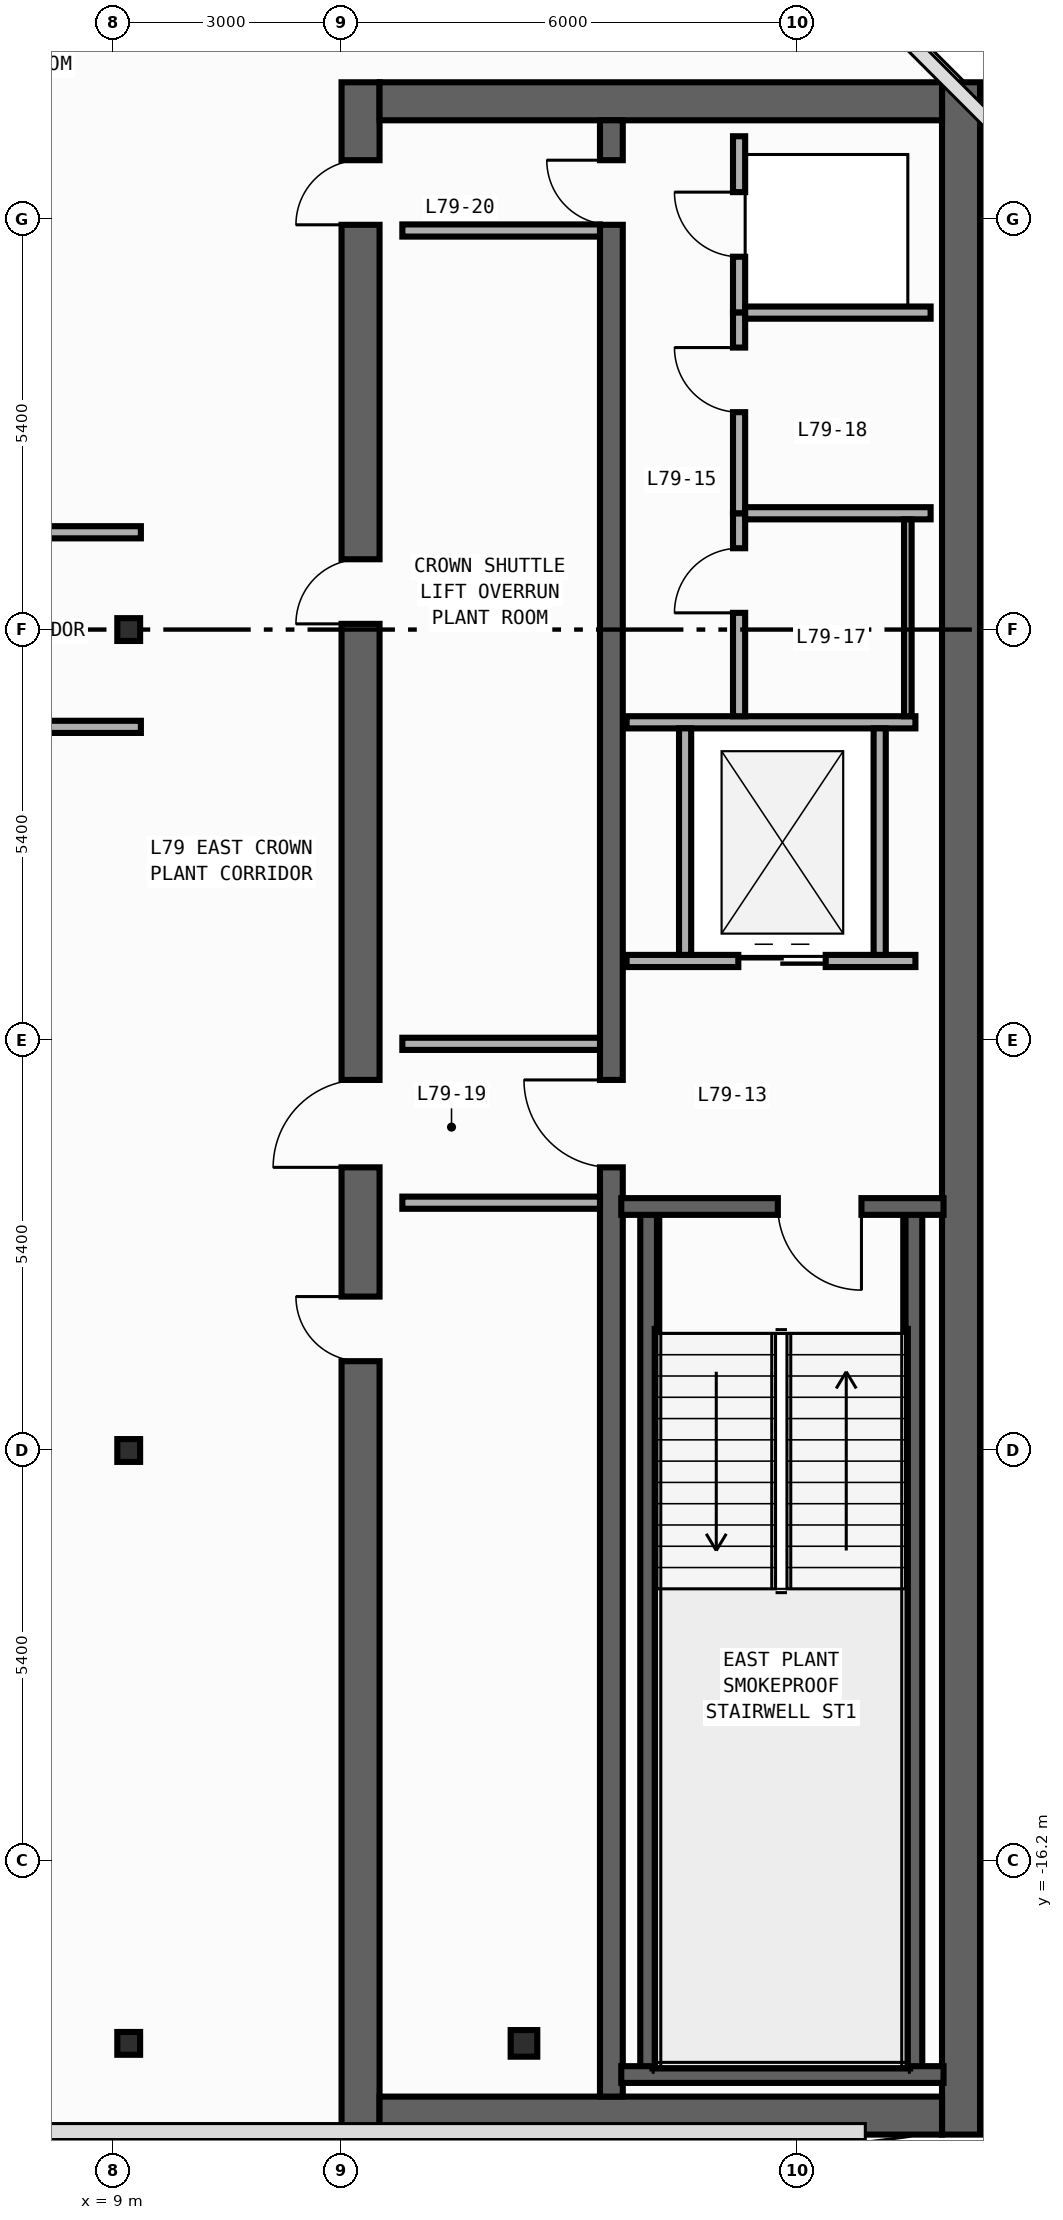
"""IFC4 building model, lengths in metres.
Left out: names, types, materials, properties, quantities, classifications, styles, units other than length and angle.
Written with IfcOpenShell. Run it as: python <this file> out.ifc"""

import sys

from ifc_helpers import new_model, si_unit, direction, frame, frame_2d, origin, origin_2d, place, context, subcontext, project, spatial, rectangle, i_section, extrude, element, fill, save


model = new_model("IFC4")
c1 = context("Model", 3, precision=1e-05, world=origin(), true_north=direction((0.0, 1.0)))
c2 = subcontext(c1, "Body", "Model", "MODEL_VIEW")
j1 = project(units=[si_unit("LENGTHUNIT", "METRE"), si_unit("PLANEANGLEUNIT", "RADIAN")], contexts=[c1])
p1 = place(None, origin())
s1 = spatial("IfcSite", under=j1, at=p1, CompositionType="ELEMENT")
p2 = place(p1, origin())
s2 = spatial("IfcBuilding", under=s1, at=p2, CompositionType="ELEMENT")
p3 = place(p2, frame((0.0, 0.0, 330.4)))
s3 = spatial("IfcBuildingStorey", under=s2, at=p3, CompositionType="ELEMENT", Elevation=330.4)
p4 = place(p3, frame((12.25, -19.8, 0.0), z_axis=(0.0, 0.0, 1.0), x_axis=(0.0, 1.0, 0.0)))
e1 = element("IfcWall", 1, at=p4, inside=s3, PredefinedType="SHEAR", context=c2, shape_type="SweptSolid", body=[
    extrude(rectangle(XDim=27.0, YDim=0.5, at=frame_2d((13.5, 0.0))), origin(), (0.0, 0.0, 1.0), 4.34),
])
p5 = place(p4, frame((19.875, 0.0, 0.0)))
e2 = element("IfcOpeningElement", 2, at=p5, cuts=e1, PredefinedType="OPENING", context=c2, shape_type="SweptSolid", body=[
    extrude(rectangle(XDim=0.85, YDim=2.1, at=frame_2d((0.425, 1.05))), frame((0.0, 0.26, 0.0), z_axis=(0.0, -1.0, 0.0), x_axis=(1.0, 0.0, 0.0)), (0.0, 0.0, 1.0), 0.52),
])
p6 = place(p4, frame((10.175, 0.0, 0.0)))
e3 = element("IfcOpeningElement", 3, at=p6, cuts=e1, PredefinedType="OPENING", context=c2, shape_type="SweptSolid", body=[
    extrude(rectangle(XDim=0.85, YDim=2.1, at=frame_2d((0.425, 1.05))), frame((0.0, 0.26, 0.0), z_axis=(0.0, -1.0, 0.0), x_axis=(1.0, 0.0, 0.0)), (0.0, 0.0, 1.0), 0.52),
])
p7 = place(p4, frame((12.725, 0.0, 0.0)))
e4 = element("IfcOpeningElement", 4, at=p7, cuts=e1, PredefinedType="OPENING", context=c2, shape_type="SweptSolid", body=[
    extrude(rectangle(XDim=1.15, YDim=2.2, at=frame_2d((0.575, 1.1))), frame((0.0, 0.26, 0.0), z_axis=(0.0, -1.0, 0.0), x_axis=(1.0, 0.0, 0.0)), (0.0, 0.0, 1.0), 0.52),
])
p8 = place(p4, frame((25.125, 0.0, 0.0)))
e5 = element("IfcOpeningElement", 5, at=p8, cuts=e1, PredefinedType="OPENING", context=c2, shape_type="SweptSolid", body=[
    extrude(rectangle(XDim=0.85, YDim=2.1, at=frame_2d((0.425, 1.05))), frame((0.0, 0.26, 0.0), z_axis=(0.0, -1.0, 0.0), x_axis=(1.0, 0.0, 0.0)), (0.0, 0.0, 1.0), 0.52),
])
p9 = place(p3, frame((20.15, -19.8, 0.0), z_axis=(0.0, 0.0, 1.0), x_axis=(0.0, 1.0, 0.0)))
e6 = element("IfcWall", 6, at=p9, inside=s3, PredefinedType="SHEAR", context=c2, shape_type="SweptSolid", body=[
    extrude(rectangle(XDim=27.0, YDim=0.5, at=frame_2d((13.5, 0.0))), origin(), (0.0, 0.0, 1.0), 4.34),
])
for number, where, z_axis, x_axis in (
    (7, (12.5, -19.55, 0.0), (0.0, 0.0, 1.0), (1.0, 0.0, 0.0)),
    (8, (12.5, 6.95, 0.0), (0.0, 0.0, 1.0), (1.0, 0.0, 0.0)),
):
    element("IfcWall", number, at=place(p3, frame(where, z_axis=z_axis, x_axis=x_axis)), inside=s3, PredefinedType="SHEAR", context=c2, shape_type="SweptSolid", body=[
        extrude(rectangle(XDim=7.4, YDim=0.5, at=frame_2d((3.7, 0.0))), origin(), (0.0, 0.0, 1.0), 4.34),
    ])
p10 = place(p3, frame((15.55, -19.3, 0.0), z_axis=(0.0, 0.0, 1.0), x_axis=(0.0, 1.0, 0.0)))
e9 = element("IfcWall", 9, at=p10, inside=s3, PredefinedType="SHEAR", context=c2, shape_type="SweptSolid", body=[
    extrude(rectangle(XDim=26.0, YDim=0.3, at=frame_2d((13.0, 0.0))), origin(), (0.0, 0.0, 1.0), 4.34),
])
p11 = place(p10, frame((12.225, 0.0, 0.0)))
e10 = element("IfcOpeningElement", 10, at=p11, cuts=e9, PredefinedType="OPENING", context=c2, shape_type="SweptSolid", body=[
    extrude(rectangle(XDim=1.15, YDim=2.2, at=frame_2d((0.575, 1.1))), frame((0.0, 0.16, 0.0), z_axis=(0.0, -1.0, 0.0), x_axis=(1.0, 0.0, 0.0)), (0.0, 0.0, 1.0), 0.32),
])
p12 = place(p10, frame((24.625, 0.0, 0.0)))
e11 = element("IfcOpeningElement", 11, at=p12, cuts=e9, PredefinedType="OPENING", context=c2, shape_type="SweptSolid", body=[
    extrude(rectangle(XDim=0.85, YDim=2.1, at=frame_2d((0.425, 1.05))), frame((0.0, 0.16, 0.0), z_axis=(0.0, -1.0, 0.0), x_axis=(1.0, 0.0, 0.0)), (0.0, 0.0, 1.0), 0.32),
])
for number, where, z_axis, x_axis in (
    (12, (16.04, -19.01, 0.0), (0.0, 0.0, 1.0), (0.0, 1.0, 0.0)),
    (13, (19.53, -19.01, 0.0), (0.0, 0.0, 1.0), (0.0, 1.0, 0.0)),
):
    element("IfcWall", number, at=place(p3, frame(where, z_axis=z_axis, x_axis=x_axis)), inside=s3, PredefinedType="SHEAR", context=c2, shape_type="SweptSolid", body=[
        extrude(rectangle(XDim=11.42, YDim=0.22, at=frame_2d((5.71, 0.0))), origin(), (0.0, 0.0, 1.0), 4.34),
    ])
p13 = place(p3, frame((15.68, -19.01, 0.0), z_axis=(0.0, 0.0, 1.0), x_axis=(1.0, 0.0, 0.0)))
e14 = element("IfcWall", 14, at=p13, inside=s3, PredefinedType="SHEAR", context=c2, shape_type="SweptSolid", body=[
    extrude(rectangle(XDim=4.24, YDim=0.22, at=frame_2d((2.12, 0.0))), origin(), (0.0, 0.0, 1.0), 4.34),
])
p14 = place(p3, frame((19.92, -7.59, 0.0), z_axis=(0.0, 0.0, 1.0), x_axis=(-1.0, 0.0, 0.0)))
e15 = element("IfcWall", 15, at=p14, inside=s3, PredefinedType="SHEAR", context=c2, shape_type="SweptSolid", body=[
    extrude(rectangle(XDim=4.24, YDim=0.22, at=frame_2d((2.12, 0.0))), origin(), (0.0, 0.0, 1.0), 4.34),
])
p15 = place(p14, frame((1.08, 0.0, 0.0)))
e16 = element("IfcOpeningElement", 16, at=p15, cuts=e15, PredefinedType="OPENING", context=c2, shape_type="SweptSolid", body=[
    extrude(rectangle(XDim=1.1, YDim=2.2, at=frame_2d((0.55, 1.1))), frame((0.0, 0.12, 0.0), z_axis=(0.0, -1.0, 0.0), x_axis=(1.0, 0.0, 0.0)), (0.0, 0.0, 1.0), 0.24),
])
for number, where, z_axis, x_axis in (
    (17, (9.2, -18.6, 0.0), (0.0, 0.0, 1.0), (1.0, 0.0, 0.0)),
    (18, (9.2, -10.8, 0.0), (0.0, 0.0, 1.0), (1.0, 0.0, 0.0)),
    (19, (9.2, 0.0, 0.0), (0.0, 0.0, 1.0), (1.0, 0.0, 0.0)),
):
    element("IfcColumn", number, at=place(p3, frame(where, z_axis=z_axis, x_axis=x_axis)), inside=s3, PredefinedType="COLUMN", context=c2, shape_type="SweptSolid", body=[
        extrude(i_section(OverallWidth=0.3, OverallDepth=0.3, WebThickness=0.01, FlangeThickness=0.015, FilletRadius=0.018, at=origin_2d()), origin(), (0.0, 0.0, 1.0), 4.6),
    ])
p16 = place(p3, frame((14.4, -18.6, 0.0), z_axis=(0.0, 0.0, 1.0), x_axis=(1.0, 0.0, 0.0)))
e20 = element("IfcColumn", 20, at=p16, inside=s3, PredefinedType="COLUMN", context=c2, shape_type="SweptSolid", body=[
    extrude(i_section(OverallWidth=0.35, OverallDepth=0.35, WebThickness=0.012, FlangeThickness=0.019, FilletRadius=0.02, at=origin_2d()), origin(), (0.0, 0.0, 1.0), 4.6),
])
p17 = place(p3, frame((15.75, -4.36, 0.0), z_axis=(0.0, 0.0, 1.0), x_axis=(1.0, 0.0, 0.0)))
e21 = element("IfcWall", 21, at=p17, inside=s3, PredefinedType="STANDARD", context=c2, shape_type="SweptSolid", body=[
    extrude(rectangle(XDim=3.8, YDim=0.16, at=frame_2d((1.9, 0.0))), origin(), (0.0, 0.0, 1.0), 4.34),
])
p18 = place(p17, frame((1.47, 0.0, 0.0)))
e22 = element("IfcOpeningElement", 22, at=p18, cuts=e21, PredefinedType="OPENING", context=c2, shape_type="SweptSolid", body=[
    extrude(rectangle(XDim=1.15, YDim=2.2, at=frame_2d((0.575, 1.1))), frame((0.0, 0.09, 0.0), z_axis=(0.0, -1.0, 0.0), x_axis=(1.0, 0.0, 0.0)), (0.0, 0.0, 1.0), 0.18),
])
p19 = place(p3, frame((15.75, -1.22, 0.0), z_axis=(0.0, 0.0, 1.0), x_axis=(1.0, 0.0, 0.0)))
e23 = element("IfcWall", 23, at=p19, inside=s3, PredefinedType="STANDARD", context=c2, shape_type="SweptSolid", body=[
    extrude(rectangle(XDim=3.8, YDim=0.16, at=frame_2d((1.9, 0.0))), origin(), (0.0, 0.0, 1.0), 4.34),
])
for number, where, z_axis, x_axis in (
    (24, (16.52, -4.28, 0.0), (0.0, 0.0, 1.0), (0.0, 1.0, 0.0)),
    (25, (19.08, -4.28, 0.0), (0.0, 0.0, 1.0), (0.0, 1.0, 0.0)),
):
    element("IfcWall", number, at=place(p3, frame(where, z_axis=z_axis, x_axis=x_axis)), inside=s3, PredefinedType="STANDARD", context=c2, shape_type="SweptSolid", body=[
        extrude(rectangle(XDim=2.98, YDim=0.16, at=frame_2d((1.49, 0.0))), origin(), (0.0, 0.0, 1.0), 4.34),
    ])
for number, where, z_axis, x_axis in (
    (26, (12.8, -5.45, 0.0), (0.0, 0.0, 1.0), (1.0, 0.0, 0.0)),
    (27, (12.8, -7.54, 0.0), (0.0, 0.0, 1.0), (1.0, 0.0, 0.0)),
    (28, (12.8, 5.25, 0.0), (0.0, 0.0, 1.0), (1.0, 0.0, 0.0)),
):
    element("IfcWall", number, at=place(p3, frame(where, z_axis=z_axis, x_axis=x_axis)), inside=s3, PredefinedType="STANDARD", context=c2, shape_type="SweptSolid", body=[
        extrude(rectangle(XDim=2.6, YDim=0.16, at=frame_2d((1.3, 0.0))), origin(), (0.0, 0.0, 1.0), 4.34),
    ])
p20 = place(p3, frame((17.23, 4.17, 0.0), z_axis=(0.0, 0.0, 1.0), x_axis=(0.0, 1.0, 0.0)))
e29 = element("IfcWall", 29, at=p20, inside=s3, PredefinedType="PARTITIONING", context=c2, shape_type="SweptSolid", body=[
    extrude(rectangle(XDim=2.32, YDim=0.16, at=frame_2d((1.16, 0.0))), origin(), (0.0, 0.0, 1.0), 4.34),
])
p21 = place(p20, frame((0.735, 0.0, 0.0)))
e30 = element("IfcOpeningElement", 30, at=p21, cuts=e29, PredefinedType="OPENING", context=c2, shape_type="SweptSolid", body=[
    extrude(rectangle(XDim=0.85, YDim=2.1, at=frame_2d((0.425, 1.05))), frame((0.0, 0.09, 0.0), z_axis=(0.0, -1.0, 0.0), x_axis=(1.0, 0.0, 0.0)), (0.0, 0.0, 1.0), 0.18),
])
p22 = place(p3, frame((17.23, -1.14, 0.0), z_axis=(0.0, 0.0, 1.0), x_axis=(0.0, 1.0, 0.0)))
e31 = element("IfcWall", 31, at=p22, inside=s3, PredefinedType="PARTITIONING", context=c2, shape_type="SweptSolid", body=[
    extrude(rectangle(XDim=2.67, YDim=0.16, at=frame_2d((1.335, 0.0))), origin(), (0.0, 0.0, 1.0), 4.34),
])
p23 = place(p22, frame((1.36, 0.0, 0.0)))
e32 = element("IfcOpeningElement", 32, at=p23, cuts=e31, PredefinedType="OPENING", context=c2, shape_type="SweptSolid", body=[
    extrude(rectangle(XDim=0.85, YDim=2.1, at=frame_2d((0.425, 1.05))), frame((0.0, 0.09, 0.0), z_axis=(0.0, -1.0, 0.0), x_axis=(1.0, 0.0, 0.0)), (0.0, 0.0, 1.0), 0.18),
])
p24 = place(p3, frame((17.23, 1.53, 0.0), z_axis=(0.0, 0.0, 1.0), x_axis=(0.0, 1.0, 0.0)))
e33 = element("IfcWall", 33, at=p24, inside=s3, PredefinedType="PARTITIONING", context=c2, shape_type="SweptSolid", body=[
    extrude(rectangle(XDim=2.64, YDim=0.16, at=frame_2d((1.32, 0.0))), origin(), (0.0, 0.0, 1.0), 4.34),
])
p25 = place(p24, frame((1.33, 0.0, 0.0)))
e34 = element("IfcOpeningElement", 34, at=p25, cuts=e33, PredefinedType="OPENING", context=c2, shape_type="SweptSolid", body=[
    extrude(rectangle(XDim=0.85, YDim=2.1, at=frame_2d((0.425, 1.05))), frame((0.0, 0.09, 0.0), z_axis=(0.0, -1.0, 0.0), x_axis=(1.0, 0.0, 0.0)), (0.0, 0.0, 1.0), 0.18),
])
for number, where, z_axis, x_axis in (
    (35, (17.31, 4.17, 0.0), (0.0, 0.0, 1.0), (1.0, 0.0, 0.0)),
    (36, (17.31, 1.53, 0.0), (0.0, 0.0, 1.0), (1.0, 0.0, 0.0)),
):
    element("IfcWall", number, at=place(p3, frame(where, z_axis=z_axis, x_axis=x_axis)), inside=s3, PredefinedType="PARTITIONING", context=c2, shape_type="SweptSolid", body=[
        extrude(rectangle(XDim=2.44, YDim=0.16, at=frame_2d((1.22, 0.0))), origin(), (0.0, 0.0, 1.0), 4.34),
    ])
p26 = place(p3, frame((-1.12, -1.28, 0.0), z_axis=(0.0, 0.0, 1.0), x_axis=(1.0, 0.0, 0.0)))
e37 = element("IfcWall", 37, at=p26, inside=s3, PredefinedType="PARTITIONING", context=c2, shape_type="SweptSolid", body=[
    extrude(rectangle(XDim=10.48, YDim=0.16, at=frame_2d((5.24, 0.0))), origin(), (0.0, 0.0, 1.0), 4.34),
])
p27 = place(p26, frame((0.661, 0.0, 0.0)))
e38 = element("IfcOpeningElement", 38, at=p27, cuts=e37, PredefinedType="OPENING", context=c2, shape_type="SweptSolid", body=[
    extrude(rectangle(XDim=0.9, YDim=2.15, at=frame_2d((0.45, 1.075))), frame((0.0, 0.09, 0.0), z_axis=(0.0, -1.0, 0.0), x_axis=(1.0, 0.0, 0.0)), (0.0, 0.0, 1.0), 0.18),
])
p28 = place(p3, frame((4.58, 1.28, 0.0), z_axis=(0.0, 0.0, 1.0), x_axis=(1.0, 0.0, 0.0)))
e39 = element("IfcWall", 39, at=p28, inside=s3, PredefinedType="PARTITIONING", context=c2, shape_type="SweptSolid", body=[
    extrude(rectangle(XDim=4.78, YDim=0.16, at=frame_2d((2.39, 0.0))), origin(), (0.0, 0.0, 1.0), 4.34),
])
p29 = place(p28, frame((0.46, 0.0, 0.0)))
e40 = element("IfcOpeningElement", 40, at=p29, cuts=e39, PredefinedType="OPENING", context=c2, shape_type="SweptSolid", body=[
    extrude(rectangle(XDim=0.9, YDim=2.15, at=frame_2d((0.45, 1.075))), frame((0.0, 0.09, 0.0), z_axis=(0.0, -1.0, 0.0), x_axis=(1.0, 0.0, 0.0)), (0.0, 0.0, 1.0), 0.18),
])
p30 = place(p3, frame((19.45, 1.45, 0.0), z_axis=(0.0, 0.0, 1.0), x_axis=(0.0, -1.0, 0.0)))
e41 = element("IfcWall", 41, at=p30, inside=s3, PredefinedType="PARTITIONING", context=c2, shape_type="SweptSolid", body=[
    extrude(rectangle(XDim=2.59, YDim=0.1, at=frame_2d((1.295, 0.0))), origin(), (0.0, 0.0, 1.0), 4.34),
])
p31 = place(p15, origin())
e42 = element("IfcDoor", 42, at=p31, inside=s3, OperationType="SINGLE_SWING_LEFT", PredefinedType="DOOR", context=c2, shape_type="SweptSolid", body=[
    extrude(rectangle(XDim=1.1, YDim=2.2, at=frame_2d((0.55, 1.1))), frame((0.0, 0.025, 0.0), z_axis=(0.0, -1.0, 0.0), x_axis=(1.0, 0.0, 0.0)), (0.0, 0.0, 1.0), 0.05),
])
fill(e16, e42)
p32 = place(p5, origin())
e43 = element("IfcDoor", 43, at=p32, inside=s3, OperationType="SINGLE_SWING_LEFT", PredefinedType="DOOR", context=c2, shape_type="SweptSolid", body=[
    extrude(rectangle(XDim=0.85, YDim=2.1, at=frame_2d((0.425, 1.05))), frame((0.0, 0.025, 0.0), z_axis=(0.0, -1.0, 0.0), x_axis=(1.0, 0.0, 0.0)), (0.0, 0.0, 1.0), 0.05),
])
fill(e2, e43)
p33 = place(p6, origin())
e44 = element("IfcDoor", 44, at=p33, inside=s3, OperationType="SINGLE_SWING_RIGHT", PredefinedType="DOOR", context=c2, shape_type="SweptSolid", body=[
    extrude(rectangle(XDim=0.85, YDim=2.1, at=frame_2d((0.425, 1.05))), frame((0.0, 0.025, 0.0), z_axis=(0.0, -1.0, 0.0), x_axis=(1.0, 0.0, 0.0)), (0.0, 0.0, 1.0), 0.05),
])
fill(e3, e44)
p34 = place(p7, origin())
e45 = element("IfcDoor", 45, at=p34, inside=s3, OperationType="SINGLE_SWING_LEFT", PredefinedType="DOOR", context=c2, shape_type="SweptSolid", body=[
    extrude(rectangle(XDim=1.15, YDim=2.2, at=frame_2d((0.575, 1.1))), frame((0.0, 0.025, 0.0), z_axis=(0.0, -1.0, 0.0), x_axis=(1.0, 0.0, 0.0)), (0.0, 0.0, 1.0), 0.05),
])
fill(e4, e45)
p35 = place(p11, origin())
e46 = element("IfcDoor", 46, at=p35, inside=s3, OperationType="SINGLE_SWING_RIGHT", PredefinedType="DOOR", context=c2, shape_type="SweptSolid", body=[
    extrude(rectangle(XDim=1.15, YDim=2.2, at=frame_2d((0.575, 1.1))), frame((0.0, 0.025, 0.0), z_axis=(0.0, -1.0, 0.0), x_axis=(1.0, 0.0, 0.0)), (0.0, 0.0, 1.0), 0.05),
])
fill(e10, e46)
p36 = place(p8, origin())
e47 = element("IfcDoor", 47, at=p36, inside=s3, OperationType="SINGLE_SWING_LEFT", PredefinedType="DOOR", context=c2, shape_type="SweptSolid", body=[
    extrude(rectangle(XDim=0.85, YDim=2.1, at=frame_2d((0.425, 1.05))), frame((0.0, 0.025, 0.0), z_axis=(0.0, -1.0, 0.0), x_axis=(1.0, 0.0, 0.0)), (0.0, 0.0, 1.0), 0.05),
])
fill(e5, e47)
p37 = place(p12, origin())
e48 = element("IfcDoor", 48, at=p37, inside=s3, OperationType="SINGLE_SWING_RIGHT", PredefinedType="DOOR", context=c2, shape_type="SweptSolid", body=[
    extrude(rectangle(XDim=0.85, YDim=2.1, at=frame_2d((0.425, 1.05))), frame((0.0, 0.025, 0.0), z_axis=(0.0, -1.0, 0.0), x_axis=(1.0, 0.0, 0.0)), (0.0, 0.0, 1.0), 0.05),
])
fill(e11, e48)
p38 = place(p18, origin())
e49 = element("IfcDoor", 49, at=p38, inside=s3, OperationType="DOUBLE_DOOR_SLIDING", PredefinedType="DOOR", context=c2, shape_type="SweptSolid", body=[
    extrude(rectangle(XDim=1.15, YDim=2.2, at=frame_2d((0.575, 1.1))), frame((0.0, 0.025, 0.0), z_axis=(0.0, -1.0, 0.0), x_axis=(1.0, 0.0, 0.0)), (0.0, 0.0, 1.0), 0.05),
])
fill(e22, e49)
p39 = place(p21, origin())
e50 = element("IfcDoor", 50, at=p39, inside=s3, OperationType="SINGLE_SWING_RIGHT", PredefinedType="DOOR", context=c2, shape_type="SweptSolid", body=[
    extrude(rectangle(XDim=0.85, YDim=2.1, at=frame_2d((0.425, 1.05))), frame((0.0, 0.025, 0.0), z_axis=(0.0, -1.0, 0.0), x_axis=(1.0, 0.0, 0.0)), (0.0, 0.0, 1.0), 0.05),
])
fill(e30, e50)
p40 = place(p23, origin())
e51 = element("IfcDoor", 51, at=p40, inside=s3, OperationType="SINGLE_SWING_LEFT", PredefinedType="DOOR", context=c2, shape_type="SweptSolid", body=[
    extrude(rectangle(XDim=0.85, YDim=2.1, at=frame_2d((0.425, 1.05))), frame((0.0, 0.025, 0.0), z_axis=(0.0, -1.0, 0.0), x_axis=(1.0, 0.0, 0.0)), (0.0, 0.0, 1.0), 0.05),
])
fill(e32, e51)
p41 = place(p25, origin())
e52 = element("IfcDoor", 52, at=p41, inside=s3, OperationType="SINGLE_SWING_RIGHT", PredefinedType="DOOR", context=c2, shape_type="SweptSolid", body=[
    extrude(rectangle(XDim=0.85, YDim=2.1, at=frame_2d((0.425, 1.05))), frame((0.0, 0.025, 0.0), z_axis=(0.0, -1.0, 0.0), x_axis=(1.0, 0.0, 0.0)), (0.0, 0.0, 1.0), 0.05),
])
fill(e34, e52)
save(model, sys.argv[1])
